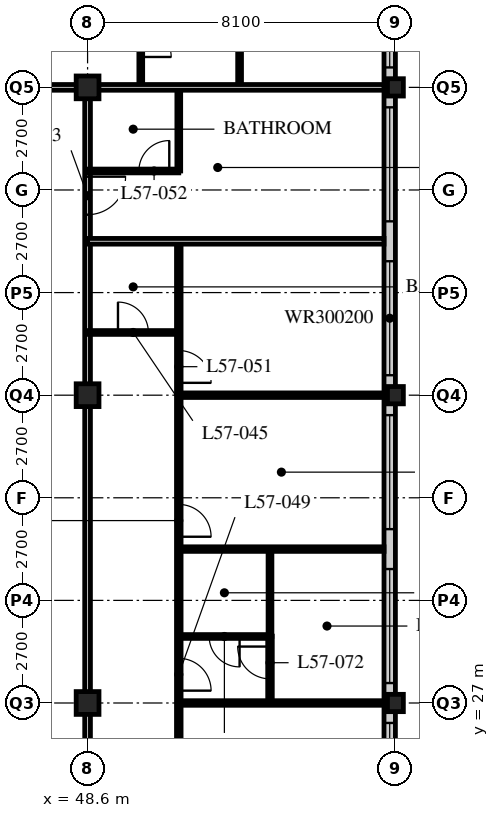
"""IFC4 building model, lengths in metres.
Left out: names, types, materials, properties, quantities, classifications, styles, units other than length and angle.
Written with IfcOpenShell. Run it as: python <this file> out.ifc"""

import sys

from ifc_helpers import new_model, si_unit, direction, frame, frame_2d, origin, origin_2d, place, context, subcontext, project, spatial, rectangle, hollow_rectangle, i_section, extrude, element, fill, save


model = new_model("IFC4")
c1 = context("Model", 3, precision=1e-05, world=origin(), true_north=direction((0.0, 1.0)))
c2 = subcontext(c1, "Body", "Model", "MODEL_VIEW")
j1 = project(units=[si_unit("LENGTHUNIT", "METRE"), si_unit("PLANEANGLEUNIT", "RADIAN")], contexts=[c1])
p1 = place(None, origin())
s1 = spatial("IfcSite", under=j1, at=p1, CompositionType="ELEMENT")
p2 = place(p1, origin())
s2 = spatial("IfcBuilding", under=s1, at=p2, CompositionType="ELEMENT")
p3 = place(p2, frame((0.0, 0.0, 220.8)))
s3 = spatial("IfcBuildingStorey", under=s2, at=p3, CompositionType="ELEMENT", Elevation=220.8)
for number, where, z_axis, x_axis in (
    (1, (48.6, 27.0, 0.0), (0.0, 0.0, 1.0), (1.0, 0.0, 0.0)),
    (2, (48.6, 35.1, 0.0), (0.0, 0.0, 1.0), (1.0, 0.0, 0.0)),
    (3, (48.6, 43.2, 0.0), (0.0, 0.0, 1.0), (1.0, 0.0, 0.0)),
):
    element("IfcColumn", number, at=place(p3, frame(where, z_axis=z_axis, x_axis=x_axis)), inside=s3, PredefinedType="COLUMN", context=c2, shape_type="SweptSolid", body=[
        extrude(hollow_rectangle(XDim=0.6, YDim=0.6, WallThickness=0.05, at=origin_2d()), origin(), (0.0, 0.0, 1.0), 3.6),
    ])
for number, where, z_axis, x_axis in (
    (4, (56.7, 27.0, 0.0), (0.0, 0.0, 1.0), (1.0, 0.0, 0.0)),
    (5, (56.7, 35.1, 0.0), (0.0, 0.0, 1.0), (1.0, 0.0, 0.0)),
    (6, (56.7, 43.2, 0.0), (0.0, 0.0, 1.0), (1.0, 0.0, 0.0)),
):
    element("IfcColumn", number, at=place(p3, frame(where, z_axis=z_axis, x_axis=x_axis)), inside=s3, PredefinedType="COLUMN", context=c2, shape_type="SweptSolid", body=[
        extrude(i_section(OverallWidth=0.418, OverallDepth=0.456, WebThickness=0.042, FlangeThickness=0.067, FilletRadius=0.015, at=origin_2d()), origin(), (0.0, 0.0, 1.0), 3.6),
    ])
p4 = place(p3, frame((56.55, 19.2, 0.0), z_axis=(0.0, 0.0, 1.0), x_axis=(0.0, 1.0, 0.0)))
e7 = element("IfcWall", 7, at=p4, inside=s3, PredefinedType="SOLIDWALL", context=c2, shape_type="SweptSolid", body=[
    extrude(rectangle(XDim=32.1, YDim=0.3, at=frame_2d((16.05, 0.0))), origin(), (0.0, 0.0, 1.0), 3.39),
])
p5 = place(p4, frame((0.225, 0.0, 0.6)))
e8 = element("IfcOpeningElement", 8, at=p5, cuts=e7, PredefinedType="OPENING", context=c2, shape_type="SweptSolid", body=[
    extrude(rectangle(XDim=3.0, YDim=2.0, at=frame_2d((1.5, 1.0))), frame((0.0, 0.16, 0.0), z_axis=(0.0, -1.0, 0.0), x_axis=(1.0, 0.0, 0.0)), (0.0, 0.0, 1.0), 0.32),
])
p6 = place(p4, frame((4.275, 0.0, 0.6)))
e9 = element("IfcOpeningElement", 9, at=p6, cuts=e7, PredefinedType="OPENING", context=c2, shape_type="SweptSolid", body=[
    extrude(rectangle(XDim=3.0, YDim=2.0, at=frame_2d((1.5, 1.0))), frame((0.0, 0.16, 0.0), z_axis=(0.0, -1.0, 0.0), x_axis=(1.0, 0.0, 0.0)), (0.0, 0.0, 1.0), 0.32),
])
p7 = place(p4, frame((8.325, 0.0, 0.6)))
e10 = element("IfcOpeningElement", 10, at=p7, cuts=e7, PredefinedType="OPENING", context=c2, shape_type="SweptSolid", body=[
    extrude(rectangle(XDim=3.0, YDim=2.0, at=frame_2d((1.5, 1.0))), frame((0.0, 0.16, 0.0), z_axis=(0.0, -1.0, 0.0), x_axis=(1.0, 0.0, 0.0)), (0.0, 0.0, 1.0), 0.32),
])
p8 = place(p4, frame((12.375, 0.0, 0.6)))
e11 = element("IfcOpeningElement", 11, at=p8, cuts=e7, PredefinedType="OPENING", context=c2, shape_type="SweptSolid", body=[
    extrude(rectangle(XDim=3.0, YDim=2.0, at=frame_2d((1.5, 1.0))), frame((0.0, 0.16, 0.0), z_axis=(0.0, -1.0, 0.0), x_axis=(1.0, 0.0, 0.0)), (0.0, 0.0, 1.0), 0.32),
])
p9 = place(p4, frame((16.425, 0.0, 0.6)))
e12 = element("IfcOpeningElement", 12, at=p9, cuts=e7, PredefinedType="OPENING", context=c2, shape_type="SweptSolid", body=[
    extrude(rectangle(XDim=3.0, YDim=2.0, at=frame_2d((1.5, 1.0))), frame((0.0, 0.16, 0.0), z_axis=(0.0, -1.0, 0.0), x_axis=(1.0, 0.0, 0.0)), (0.0, 0.0, 1.0), 0.32),
])
p10 = place(p4, frame((20.475, 0.0, 0.6)))
e13 = element("IfcOpeningElement", 13, at=p10, cuts=e7, PredefinedType="OPENING", context=c2, shape_type="SweptSolid", body=[
    extrude(rectangle(XDim=3.0, YDim=2.0, at=frame_2d((1.5, 1.0))), frame((0.0, 0.16, 0.0), z_axis=(0.0, -1.0, 0.0), x_axis=(1.0, 0.0, 0.0)), (0.0, 0.0, 1.0), 0.32),
])
p11 = place(p4, frame((24.525, 0.0, 0.6)))
e14 = element("IfcOpeningElement", 14, at=p11, cuts=e7, PredefinedType="OPENING", context=c2, shape_type="SweptSolid", body=[
    extrude(rectangle(XDim=3.0, YDim=2.0, at=frame_2d((1.5, 1.0))), frame((0.0, 0.16, 0.0), z_axis=(0.0, -1.0, 0.0), x_axis=(1.0, 0.0, 0.0)), (0.0, 0.0, 1.0), 0.32),
])
p12 = place(p4, frame((28.575, 0.0, 0.6)))
e15 = element("IfcOpeningElement", 15, at=p12, cuts=e7, PredefinedType="OPENING", context=c2, shape_type="SweptSolid", body=[
    extrude(rectangle(XDim=3.0, YDim=2.0, at=frame_2d((1.5, 1.0))), frame((0.0, 0.16, 0.0), z_axis=(0.0, -1.0, 0.0), x_axis=(1.0, 0.0, 0.0)), (0.0, 0.0, 1.0), 0.32),
])
p13 = place(p3, frame((12.15, 43.2, 0.0), z_axis=(0.0, 0.0, 1.0), x_axis=(1.0, 0.0, 0.0)))
e16 = element("IfcWall", 16, at=p13, inside=s3, PredefinedType="PARTITIONING", context=c2, shape_type="SweptSolid", body=[
    extrude(rectangle(XDim=36.45, YDim=0.15, at=frame_2d((18.225, 0.0))), origin(), (0.0, 0.0, 1.0), 2.628),
])
p14 = place(p13, frame((4.95, 0.0, 0.0)))
e17 = element("IfcOpeningElement", 17, at=p14, cuts=e16, PredefinedType="OPENING", context=c2, shape_type="SweptSolid", body=[
    extrude(rectangle(XDim=1.0, YDim=2.1, at=frame_2d((0.5, 1.05))), frame((0.0, 0.085, 0.0), z_axis=(0.0, -1.0, 0.0), x_axis=(1.0, 0.0, 0.0)), (0.0, 0.0, 1.0), 0.17),
])
p15 = place(p13, frame((25.0, 0.0, 0.0)))
e18 = element("IfcOpeningElement", 18, at=p15, cuts=e16, PredefinedType="OPENING", context=c2, shape_type="SweptSolid", body=[
    extrude(rectangle(XDim=1.0, YDim=2.1, at=frame_2d((0.5, 1.05))), frame((0.0, 0.085, 0.0), z_axis=(0.0, -1.0, 0.0), x_axis=(1.0, 0.0, 0.0)), (0.0, 0.0, 1.0), 0.17),
])
p16 = place(p13, frame((30.7, 0.0, 0.0)))
e19 = element("IfcOpeningElement", 19, at=p16, cuts=e16, PredefinedType="OPENING", context=c2, shape_type="SweptSolid", body=[
    extrude(rectangle(XDim=1.0, YDim=2.1, at=frame_2d((0.5, 1.05))), frame((0.0, 0.085, 0.0), z_axis=(0.0, -1.0, 0.0), x_axis=(1.0, 0.0, 0.0)), (0.0, 0.0, 1.0), 0.17),
])
p17 = place(p13, frame((33.925, 0.0, 0.0)))
e20 = element("IfcOpeningElement", 20, at=p17, cuts=e16, PredefinedType="OPENING", context=c2, shape_type="SweptSolid", body=[
    extrude(rectangle(XDim=1.0, YDim=2.1, at=frame_2d((0.5, 1.05))), frame((0.0, 0.085, 0.0), z_axis=(0.0, -1.0, 0.0), x_axis=(1.0, 0.0, 0.0)), (0.0, 0.0, 1.0), 0.17),
])
p18 = place(p13, frame((1.525, 0.0, 0.0)))
e21 = element("IfcOpeningElement", 21, at=p18, cuts=e16, PredefinedType="OPENING", context=c2, shape_type="SweptSolid", body=[
    extrude(rectangle(XDim=1.0, YDim=2.1, at=frame_2d((0.5, 1.05))), frame((0.0, 0.085, 0.0), z_axis=(0.0, -1.0, 0.0), x_axis=(1.0, 0.0, 0.0)), (0.0, 0.0, 1.0), 0.17),
])
p19 = place(p3, frame((48.6, 18.9, 0.0), z_axis=(0.0, 0.0, 1.0), x_axis=(0.0, 1.0, 0.0)))
e22 = element("IfcWall", 22, at=p19, inside=s3, PredefinedType="PARTITIONING", context=c2, shape_type="SweptSolid", body=[
    extrude(rectangle(XDim=24.3, YDim=0.15, at=frame_2d((12.15, 0.0))), origin(), (0.0, 0.0, 1.0), 2.628),
])
p20 = place(p19, frame((0.9, 0.0, 0.0)))
e23 = element("IfcOpeningElement", 23, at=p20, cuts=e22, PredefinedType="OPENING", context=c2, shape_type="SweptSolid", body=[
    extrude(rectangle(XDim=1.0, YDim=2.1, at=frame_2d((0.5, 1.05))), frame((0.0, 0.085, 0.0), z_axis=(0.0, -1.0, 0.0), x_axis=(1.0, 0.0, 0.0)), (0.0, 0.0, 1.0), 0.17),
])
p21 = place(p19, frame((20.95, 0.0, 0.0)))
e24 = element("IfcOpeningElement", 24, at=p21, cuts=e22, PredefinedType="OPENING", context=c2, shape_type="SweptSolid", body=[
    extrude(rectangle(XDim=1.0, YDim=2.1, at=frame_2d((0.5, 1.05))), frame((0.0, 0.085, 0.0), z_axis=(0.0, -1.0, 0.0), x_axis=(1.0, 0.0, 0.0)), (0.0, 0.0, 1.0), 0.17),
])
p22 = place(p3, frame((51.0, 18.9, 0.0), z_axis=(0.0, 0.0, 1.0), x_axis=(0.0, 1.0, 0.0)))
e25 = element("IfcWall", 25, at=p22, inside=s3, PredefinedType="PARTITIONING", context=c2, shape_type="SweptSolid", body=[
    extrude(rectangle(XDim=20.25, YDim=0.12, at=frame_2d((10.125, 0.0))), origin(), (0.0, 0.0, 1.0), 3.39),
])
p23 = place(p22, frame((0.975, 0.0, 0.0)))
e26 = element("IfcOpeningElement", 26, at=p23, cuts=e25, PredefinedType="OPENING", context=c2, shape_type="SweptSolid", body=[
    extrude(rectangle(XDim=0.85, YDim=2.1, at=frame_2d((0.425, 1.05))), frame((0.0, 0.07, 0.0), z_axis=(0.0, -1.0, 0.0), x_axis=(1.0, 0.0, 0.0)), (0.0, 0.0, 1.0), 0.14),
])
p24 = place(p22, frame((8.425, 0.0, 0.0)))
e27 = element("IfcOpeningElement", 27, at=p24, cuts=e25, PredefinedType="OPENING", context=c2, shape_type="SweptSolid", body=[
    extrude(rectangle(XDim=0.85, YDim=2.1, at=frame_2d((0.425, 1.05))), frame((0.0, 0.07, 0.0), z_axis=(0.0, -1.0, 0.0), x_axis=(1.0, 0.0, 0.0)), (0.0, 0.0, 1.0), 0.14),
])
p25 = place(p22, frame((12.475, 0.0, 0.0)))
e28 = element("IfcOpeningElement", 28, at=p25, cuts=e25, PredefinedType="OPENING", context=c2, shape_type="SweptSolid", body=[
    extrude(rectangle(XDim=0.85, YDim=2.1, at=frame_2d((0.425, 1.05))), frame((0.0, 0.07, 0.0), z_axis=(0.0, -1.0, 0.0), x_axis=(1.0, 0.0, 0.0)), (0.0, 0.0, 1.0), 0.14),
])
p26 = place(p22, frame((16.525, 0.0, 0.0)))
e29 = element("IfcOpeningElement", 29, at=p26, cuts=e25, PredefinedType="OPENING", context=c2, shape_type="SweptSolid", body=[
    extrude(rectangle(XDim=0.85, YDim=2.1, at=frame_2d((0.425, 1.05))), frame((0.0, 0.07, 0.0), z_axis=(0.0, -1.0, 0.0), x_axis=(1.0, 0.0, 0.0)), (0.0, 0.0, 1.0), 0.14),
])
p27 = place(p3, frame((48.6, 36.75, 0.0), z_axis=(0.0, 0.0, 1.0), x_axis=(1.0, 0.0, 0.0)))
e30 = element("IfcWall", 30, at=p27, inside=s3, PredefinedType="PARTITIONING", context=c2, shape_type="SweptSolid", body=[
    extrude(rectangle(XDim=2.4, YDim=0.1, at=frame_2d((1.2, 0.0))), origin(), (0.0, 0.0, 1.0), 3.39),
])
p28 = place(p27, frame((0.8, 0.0, 0.0)))
e31 = element("IfcOpeningElement", 31, at=p28, cuts=e30, PredefinedType="OPENING", context=c2, shape_type="SweptSolid", body=[
    extrude(rectangle(XDim=0.8, YDim=2.1, at=frame_2d((0.4, 1.05))), frame((0.0, 0.06, 0.0), z_axis=(0.0, -1.0, 0.0), x_axis=(1.0, 0.0, 0.0)), (0.0, 0.0, 1.0), 0.12),
])
p29 = place(p3, frame((51.0, 28.75, 0.0), z_axis=(0.0, 0.0, 1.0), x_axis=(1.0, 0.0, 0.0)))
e32 = element("IfcWall", 32, at=p29, inside=s3, PredefinedType="PARTITIONING", context=c2, shape_type="SweptSolid", body=[
    extrude(rectangle(XDim=2.4, YDim=0.1, at=frame_2d((1.2, 0.0))), origin(), (0.0, 0.0, 1.0), 3.39),
])
p30 = place(p29, frame((0.8, 0.0, 0.0)))
e33 = element("IfcOpeningElement", 33, at=p30, cuts=e32, PredefinedType="OPENING", context=c2, shape_type="SweptSolid", body=[
    extrude(rectangle(XDim=0.8, YDim=2.1, at=frame_2d((0.4, 1.05))), frame((0.0, 0.06, 0.0), z_axis=(0.0, -1.0, 0.0), x_axis=(1.0, 0.0, 0.0)), (0.0, 0.0, 1.0), 0.12),
])
p31 = place(p3, frame((53.4, 28.75, 0.0), z_axis=(0.0, 0.0, 1.0), x_axis=(0.0, 1.0, 0.0)))
e34 = element("IfcWall", 34, at=p31, inside=s3, PredefinedType="PARTITIONING", context=c2, shape_type="SweptSolid", body=[
    extrude(rectangle(XDim=2.3, YDim=0.1, at=frame_2d((1.15, 0.0))), origin(), (0.0, 0.0, 1.0), 3.39),
])
p32 = place(p3, frame((51.0, 27.0, 0.0), z_axis=(0.0, 0.0, 1.0), x_axis=(1.0, 0.0, 0.0)))
e35 = element("IfcWall", 35, at=p32, inside=s3, PredefinedType="PARTITIONING", context=c2, shape_type="SweptSolid", body=[
    extrude(rectangle(XDim=5.4, YDim=0.12, at=frame_2d((2.7, 0.0))), origin(), (0.0, 0.0, 1.0), 2.628),
])
p33 = place(p3, frame((51.0, 31.05, 0.0), z_axis=(0.0, 0.0, 1.0), x_axis=(1.0, 0.0, 0.0)))
e36 = element("IfcWall", 36, at=p33, inside=s3, PredefinedType="PARTITIONING", context=c2, shape_type="SweptSolid", body=[
    extrude(rectangle(XDim=5.4, YDim=0.12, at=frame_2d((2.7, 0.0))), origin(), (0.0, 0.0, 1.0), 3.39),
])
p34 = place(p3, frame((51.0, 35.1, 0.0), z_axis=(0.0, 0.0, 1.0), x_axis=(1.0, 0.0, 0.0)))
e37 = element("IfcWall", 37, at=p34, inside=s3, PredefinedType="PARTITIONING", context=c2, shape_type="SweptSolid", body=[
    extrude(rectangle(XDim=5.4, YDim=0.12, at=frame_2d((2.7, 0.0))), origin(), (0.0, 0.0, 1.0), 2.628),
])
p35 = place(p3, frame((48.6, 39.15, 0.0), z_axis=(0.0, 0.0, 1.0), x_axis=(1.0, 0.0, 0.0)))
e38 = element("IfcWall", 38, at=p35, inside=s3, PredefinedType="PARTITIONING", context=c2, shape_type="SweptSolid", body=[
    extrude(rectangle(XDim=7.8, YDim=0.15, at=frame_2d((3.9, 0.0))), origin(), (0.0, 0.0, 1.0), 3.39),
])
p36 = place(p3, frame((51.0, 41.0, 0.0), z_axis=(0.0, 0.0, 1.0), x_axis=(0.0, 1.0, 0.0)))
e39 = element("IfcWall", 39, at=p36, inside=s3, PredefinedType="PARTITIONING", context=c2, shape_type="SweptSolid", body=[
    extrude(rectangle(XDim=2.2, YDim=0.1, at=frame_2d((1.1, 0.0))), origin(), (0.0, 0.0, 1.0), 3.39),
])
p37 = place(p3, frame((48.6, 41.0, 0.0), z_axis=(0.0, 0.0, 1.0), x_axis=(1.0, 0.0, 0.0)))
e40 = element("IfcWall", 40, at=p37, inside=s3, PredefinedType="PARTITIONING", context=c2, shape_type="SweptSolid", body=[
    extrude(rectangle(XDim=2.4, YDim=0.1, at=frame_2d((1.2, 0.0))), origin(), (0.0, 0.0, 1.0), 3.39),
])
p38 = place(p37, frame((1.35, 0.0, 0.0)))
e41 = element("IfcOpeningElement", 41, at=p38, cuts=e40, PredefinedType="OPENING", context=c2, shape_type="SweptSolid", body=[
    extrude(rectangle(XDim=0.8, YDim=2.1, at=frame_2d((0.4, 1.05))), frame((0.0, 0.06, 0.0), z_axis=(0.0, -1.0, 0.0), x_axis=(1.0, 0.0, 0.0)), (0.0, 0.0, 1.0), 0.12),
])
p39 = place(p3, frame((50.0, 43.2, 0.0), z_axis=(0.0, 0.0, 1.0), x_axis=(0.0, 1.0, 0.0)))
e42 = element("IfcWall", 42, at=p39, inside=s3, PredefinedType="PARTITIONING", context=c2, shape_type="SweptSolid", body=[
    extrude(rectangle(XDim=2.4, YDim=0.1, at=frame_2d((1.2, 0.0))), origin(), (0.0, 0.0, 1.0), 3.39),
])
p40 = place(p39, frame((0.8, 0.0, 0.0)))
e43 = element("IfcOpeningElement", 43, at=p40, cuts=e42, PredefinedType="OPENING", context=c2, shape_type="SweptSolid", body=[
    extrude(rectangle(XDim=0.8, YDim=2.1, at=frame_2d((0.4, 1.05))), frame((0.0, 0.06, 0.0), z_axis=(0.0, -1.0, 0.0), x_axis=(1.0, 0.0, 0.0)), (0.0, 0.0, 1.0), 0.12),
])
p41 = place(p3, frame((52.6, 43.2, 0.0), z_axis=(0.0, 0.0, 1.0), x_axis=(0.0, 1.0, 0.0)))
e44 = element("IfcWall", 44, at=p41, inside=s3, PredefinedType="PARTITIONING", context=c2, shape_type="SweptSolid", body=[
    extrude(rectangle(XDim=2.4, YDim=0.1, at=frame_2d((1.2, 0.0))), origin(), (0.0, 0.0, 1.0), 3.39),
])
p42 = place(p3, frame((48.6, 43.2, 0.0), z_axis=(0.0, 0.0, 1.0), x_axis=(1.0, 0.0, 0.0)))
e45 = element("IfcWall", 45, at=p42, inside=s3, PredefinedType="PARTITIONING", context=c2, shape_type="SweptSolid", body=[
    extrude(rectangle(XDim=7.8, YDim=0.15, at=frame_2d((3.9, 0.0))), origin(), (0.0, 0.0, 1.0), 2.628),
])
p43 = place(p3, frame((53.4, 28.76, 0.0), z_axis=(0.0, 0.0, 1.0), x_axis=(0.0, -1.0, 0.0)))
e46 = element("IfcWall", 46, at=p43, inside=s3, PredefinedType="PARTITIONING", context=c2, shape_type="SweptSolid", body=[
    extrude(rectangle(XDim=1.76, YDim=0.12, at=frame_2d((0.88, 0.0))), origin(), (0.0, 0.0, 1.0), 3.39),
])
p44 = place(p43, frame((0.275, 0.0, 0.0)))
e47 = element("IfcOpeningElement", 47, at=p44, cuts=e46, PredefinedType="OPENING", context=c2, shape_type="SweptSolid", body=[
    extrude(rectangle(XDim=0.85, YDim=2.1, at=frame_2d((0.425, 1.05))), frame((0.0, 0.07, 0.0), z_axis=(0.0, -1.0, 0.0), x_axis=(1.0, 0.0, 0.0)), (0.0, 0.0, 1.0), 0.14),
])
p45 = place(p6, origin())
e48 = element("IfcWindow", 48, at=p45, inside=s3, PartitioningType="SINGLE_PANEL", PredefinedType="WINDOW", context=c2, shape_type="SweptSolid", body=[
    extrude(rectangle(XDim=3.0, YDim=2.0, at=frame_2d((1.5, 1.0))), frame((0.0, 0.03, 0.0), z_axis=(0.0, -1.0, 0.0), x_axis=(1.0, 0.0, 0.0)), (0.0, 0.0, 1.0), 0.06),
])
fill(e9, e48)
p46 = place(p7, origin())
e49 = element("IfcWindow", 49, at=p46, inside=s3, PartitioningType="SINGLE_PANEL", PredefinedType="WINDOW", context=c2, shape_type="SweptSolid", body=[
    extrude(rectangle(XDim=3.0, YDim=2.0, at=frame_2d((1.5, 1.0))), frame((0.0, 0.03, 0.0), z_axis=(0.0, -1.0, 0.0), x_axis=(1.0, 0.0, 0.0)), (0.0, 0.0, 1.0), 0.06),
])
fill(e10, e49)
p47 = place(p8, origin())
e50 = element("IfcWindow", 50, at=p47, inside=s3, PartitioningType="SINGLE_PANEL", PredefinedType="WINDOW", context=c2, shape_type="SweptSolid", body=[
    extrude(rectangle(XDim=3.0, YDim=2.0, at=frame_2d((1.5, 1.0))), frame((0.0, 0.03, 0.0), z_axis=(0.0, -1.0, 0.0), x_axis=(1.0, 0.0, 0.0)), (0.0, 0.0, 1.0), 0.06),
])
fill(e11, e50)
p48 = place(p9, origin())
e51 = element("IfcWindow", 51, at=p48, inside=s3, PartitioningType="SINGLE_PANEL", PredefinedType="WINDOW", context=c2, shape_type="SweptSolid", body=[
    extrude(rectangle(XDim=3.0, YDim=2.0, at=frame_2d((1.5, 1.0))), frame((0.0, 0.03, 0.0), z_axis=(0.0, -1.0, 0.0), x_axis=(1.0, 0.0, 0.0)), (0.0, 0.0, 1.0), 0.06),
])
fill(e12, e51)
p49 = place(p10, origin())
e52 = element("IfcWindow", 52, at=p49, inside=s3, PartitioningType="SINGLE_PANEL", PredefinedType="WINDOW", context=c2, shape_type="SweptSolid", body=[
    extrude(rectangle(XDim=3.0, YDim=2.0, at=frame_2d((1.5, 1.0))), frame((0.0, 0.03, 0.0), z_axis=(0.0, -1.0, 0.0), x_axis=(1.0, 0.0, 0.0)), (0.0, 0.0, 1.0), 0.06),
])
fill(e13, e52)
p50 = place(p11, origin())
e53 = element("IfcWindow", 53, at=p50, inside=s3, PartitioningType="SINGLE_PANEL", PredefinedType="WINDOW", context=c2, shape_type="SweptSolid", body=[
    extrude(rectangle(XDim=3.0, YDim=2.0, at=frame_2d((1.5, 1.0))), frame((0.0, 0.03, 0.0), z_axis=(0.0, -1.0, 0.0), x_axis=(1.0, 0.0, 0.0)), (0.0, 0.0, 1.0), 0.06),
])
fill(e14, e53)
p51 = place(p28, origin())
e54 = element("IfcDoor", 54, at=p51, inside=s3, OperationType="SINGLE_SWING_LEFT", PredefinedType="DOOR", context=c2, shape_type="SweptSolid", body=[
    extrude(rectangle(XDim=0.8, YDim=2.1, at=frame_2d((0.4, 1.05))), frame((0.0, 0.025, 0.0), z_axis=(0.0, -1.0, 0.0), x_axis=(1.0, 0.0, 0.0)), (0.0, 0.0, 1.0), 0.05),
])
fill(e31, e54)
p52 = place(p30, origin())
e55 = element("IfcDoor", 55, at=p52, inside=s3, OperationType="SINGLE_SWING_LEFT", PredefinedType="DOOR", context=c2, shape_type="SweptSolid", body=[
    extrude(rectangle(XDim=0.8, YDim=2.1, at=frame_2d((0.4, 1.05))), frame((0.0, 0.025, 0.0), z_axis=(0.0, -1.0, 0.0), x_axis=(1.0, 0.0, 0.0)), (0.0, 0.0, 1.0), 0.05),
])
fill(e33, e55)
p53 = place(p24, origin())
e56 = element("IfcDoor", 56, at=p53, inside=s3, OperationType="SINGLE_SWING_RIGHT", PredefinedType="DOOR", context=c2, shape_type="SweptSolid", body=[
    extrude(rectangle(XDim=0.85, YDim=2.1, at=frame_2d((0.425, 1.05))), frame((0.0, 0.025, 0.0), z_axis=(0.0, -1.0, 0.0), x_axis=(1.0, 0.0, 0.0)), (0.0, 0.0, 1.0), 0.05),
])
fill(e27, e56)
p54 = place(p25, origin())
e57 = element("IfcDoor", 57, at=p54, inside=s3, OperationType="SINGLE_SWING_RIGHT", PredefinedType="DOOR", context=c2, shape_type="SweptSolid", body=[
    extrude(rectangle(XDim=0.85, YDim=2.1, at=frame_2d((0.425, 1.05))), frame((0.0, 0.025, 0.0), z_axis=(0.0, -1.0, 0.0), x_axis=(1.0, 0.0, 0.0)), (0.0, 0.0, 1.0), 0.05),
])
fill(e28, e57)
p55 = place(p26, origin())
e58 = element("IfcDoor", 58, at=p55, inside=s3, OperationType="SINGLE_SWING_RIGHT", PredefinedType="DOOR", context=c2, shape_type="SweptSolid", body=[
    extrude(rectangle(XDim=0.85, YDim=2.1, at=frame_2d((0.425, 1.05))), frame((0.0, 0.025, 0.0), z_axis=(0.0, -1.0, 0.0), x_axis=(1.0, 0.0, 0.0)), (0.0, 0.0, 1.0), 0.05),
])
fill(e29, e58)
p56 = place(p38, origin())
e59 = element("IfcDoor", 59, at=p56, inside=s3, OperationType="SINGLE_SWING_RIGHT", PredefinedType="DOOR", context=c2, shape_type="SweptSolid", body=[
    extrude(rectangle(XDim=0.8, YDim=2.1, at=frame_2d((0.4, 1.05))), frame((0.0, 0.025, 0.0), z_axis=(0.0, -1.0, 0.0), x_axis=(1.0, 0.0, 0.0)), (0.0, 0.0, 1.0), 0.05),
])
fill(e41, e59)
p57 = place(p21, origin())
e60 = element("IfcDoor", 60, at=p57, inside=s3, OperationType="SINGLE_SWING_LEFT", PredefinedType="DOOR", context=c2, shape_type="SweptSolid", body=[
    extrude(rectangle(XDim=1.0, YDim=2.1, at=frame_2d((0.5, 1.05))), frame((0.0, 0.025, 0.0), z_axis=(0.0, -1.0, 0.0), x_axis=(1.0, 0.0, 0.0)), (0.0, 0.0, 1.0), 0.05),
])
fill(e24, e60)
p58 = place(p40, origin())
e61 = element("IfcDoor", 61, at=p58, inside=s3, OperationType="SINGLE_SWING_RIGHT", PredefinedType="DOOR", context=c2, shape_type="SweptSolid", body=[
    extrude(rectangle(XDim=0.8, YDim=2.1, at=frame_2d((0.4, 1.05))), frame((0.0, 0.025, 0.0), z_axis=(0.0, -1.0, 0.0), x_axis=(1.0, 0.0, 0.0)), (0.0, 0.0, 1.0), 0.05),
])
fill(e43, e61)
p59 = place(p44, origin())
e62 = element("IfcDoor", 62, at=p59, inside=s3, OperationType="SINGLE_SWING_RIGHT", PredefinedType="DOOR", context=c2, shape_type="SweptSolid", body=[
    extrude(rectangle(XDim=0.85, YDim=2.1, at=frame_2d((0.425, 1.05))), frame((0.0, 0.025, 0.0), z_axis=(0.0, -1.0, 0.0), x_axis=(1.0, 0.0, 0.0)), (0.0, 0.0, 1.0), 0.05),
])
fill(e47, e62)
save(model, sys.argv[1])
